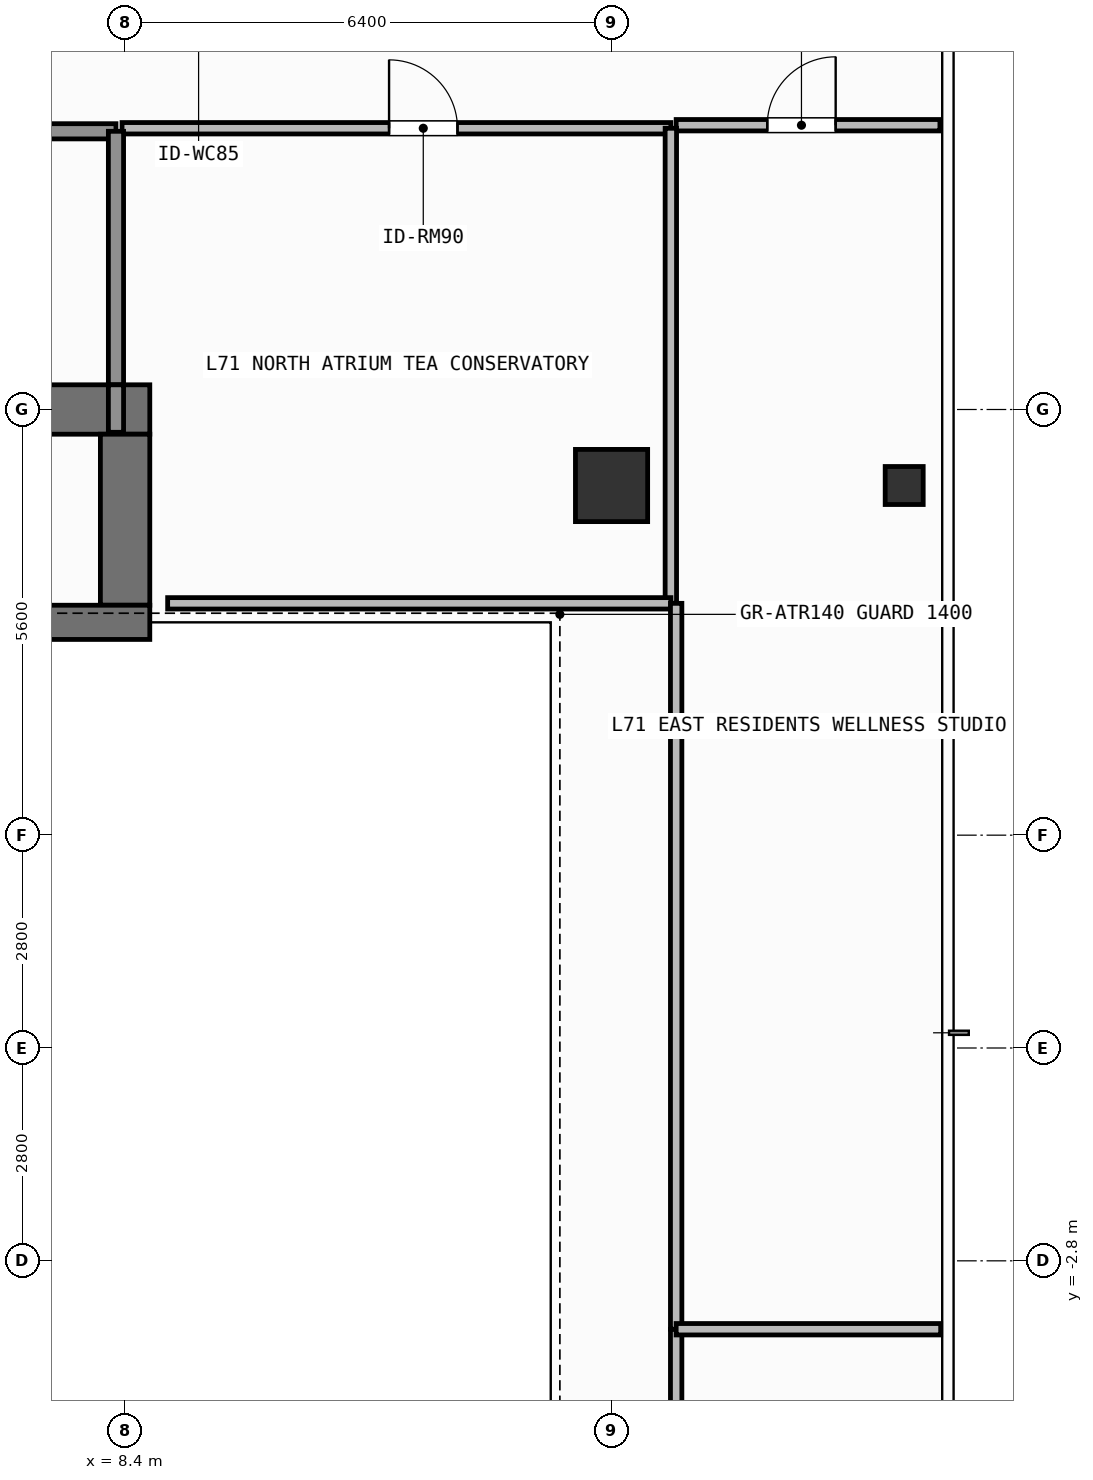
"""IFC4 building model, lengths in metres.
Left out: names, types, materials, properties, quantities, classifications, styles, units other than length and angle.
Written with IfcOpenShell. Run it as: python <this file> out.ifc"""

import sys

from ifc_helpers import new_model, si_unit, direction, frame, frame_2d, origin, origin_2d, place, context, subcontext, project, spatial, rectangle, hollow_rectangle, extrude, element, fill, save


model = new_model("IFC4")
c1 = context("Model", 3, precision=1e-05, world=origin(), true_north=direction((0.0, 1.0)))
c2 = subcontext(c1, "Body", "Model", "MODEL_VIEW")
j1 = project(units=[si_unit("LENGTHUNIT", "METRE"), si_unit("PLANEANGLEUNIT", "RADIAN")], contexts=[c1])
p1 = place(None, origin())
s1 = spatial("IfcSite", under=j1, at=p1, CompositionType="ELEMENT")
p2 = place(p1, origin())
s2 = spatial("IfcBuilding", under=s1, at=p2, CompositionType="ELEMENT")
p3 = place(p2, frame((0.0, 0.0, 289.8)))
s3 = spatial("IfcBuildingStorey", under=s2, at=p3, CompositionType="ELEMENT", Elevation=289.8)
p4 = place(p3, frame((-7.55, 8.4, 0.0), z_axis=(0.0, 0.0, 1.0), x_axis=(1.0, 0.0, 0.0)))
e1 = element("IfcWall", 1, at=p4, inside=s3, PredefinedType="SHEAR", context=c2, shape_type="SweptSolid", body=[
    extrude(rectangle(XDim=16.275, YDim=0.65, at=frame_2d((8.138, 0.0))), origin(), (0.0, 0.0, 1.0), 3.9),
])
p5 = place(p3, frame((8.4, 5.825, 0.0), z_axis=(0.0, 0.0, 1.0), x_axis=(0.0, 1.0, 0.0)))
e2 = element("IfcWall", 2, at=p5, inside=s3, PredefinedType="SHEAR", context=c2, shape_type="SweptSolid", body=[
    extrude(rectangle(XDim=2.25, YDim=0.65, at=frame_2d((1.125, 0.0))), origin(), (0.0, 0.0, 1.0), 3.9),
])
p6 = place(p3, frame((3.045, 5.6, 0.0), z_axis=(0.0, 0.0, 1.0), x_axis=(1.0, 0.0, 0.0)))
e3 = element("IfcWall", 3, at=p6, inside=s3, PredefinedType="SHEAR", context=c2, shape_type="SweptSolid", body=[
    extrude(rectangle(XDim=5.68, YDim=0.45, at=frame_2d((2.84, 0.0))), origin(), (0.0, 0.0, 1.0), 3.9),
])
p7 = place(p3, frame((14.8, 7.4, 0.0), z_axis=(0.0, 0.0, 1.0), x_axis=(1.0, 0.0, 0.0)))
e4 = element("IfcColumn", 4, at=p7, inside=s3, PredefinedType="COLUMN", context=c2, shape_type="SweptSolid", body=[
    extrude(rectangle(XDim=0.95, YDim=0.95, at=origin_2d()), origin(), (0.0, 0.0, 1.0), 3.9),
])
p8 = place(p3, frame((18.65, 7.4, 0.0), z_axis=(0.0, 0.0, 1.0), x_axis=(1.0, 0.0, 0.0)))
e5 = element("IfcColumn", 5, at=p8, inside=s3, PredefinedType="COLUMN", context=c2, shape_type="SweptSolid", body=[
    extrude(hollow_rectangle(XDim=0.5, YDim=0.5, WallThickness=0.025, at=origin_2d()), origin(), (0.0, 0.0, 1.0), 3.9),
])
p9 = place(p3, frame((4.58, 12.06, 0.0), z_axis=(0.0, 0.0, 1.0), x_axis=(1.0, 0.0, 0.0)))
e6 = element("IfcWall", 6, at=p9, inside=s3, PredefinedType="SOLIDWALL", context=c2, shape_type="SweptSolid", body=[
    extrude(rectangle(XDim=3.7, YDim=0.2, at=frame_2d((1.85, 0.0))), origin(), (0.0, 0.0, 1.0), 3.68),
])
p10 = place(p9, frame((1.212, 0.0, 0.0)))
e7 = element("IfcOpeningElement", 7, at=p10, cuts=e6, PredefinedType="OPENING", context=c2, shape_type="SweptSolid", body=[
    extrude(rectangle(XDim=1.1, YDim=2.15, at=frame_2d((0.55, 1.075))), frame((0.0, 0.11, 0.0), z_axis=(0.0, -1.0, 0.0), x_axis=(1.0, 0.0, 0.0)), (0.0, 0.0, 1.0), 0.22),
])
p11 = place(p3, frame((8.36, 12.1, 0.0), z_axis=(0.0, 0.0, 1.0), x_axis=(1.0, 0.0, 0.0)))
e8 = element("IfcWall", 8, at=p11, inside=s3, PredefinedType="PARTITIONING", context=c2, shape_type="SweptSolid", body=[
    extrude(rectangle(XDim=7.22, YDim=0.15, at=frame_2d((3.61, 0.0))), origin(), (0.0, 0.0, 1.0), 3.68),
])
p12 = place(p11, frame((3.513, 0.0, 0.0)))
e9 = element("IfcOpeningElement", 9, at=p12, cuts=e8, PredefinedType="OPENING", context=c2, shape_type="SweptSolid", body=[
    extrude(rectangle(XDim=0.9, YDim=2.1, at=frame_2d((0.45, 1.05))), frame((0.0, 0.085, 0.0), z_axis=(0.0, -1.0, 0.0), x_axis=(1.0, 0.0, 0.0)), (0.0, 0.0, 1.0), 0.17),
])
p13 = place(p3, frame((15.65, 12.14, 0.0), z_axis=(0.0, 0.0, 1.0), x_axis=(1.0, 0.0, 0.0)))
e10 = element("IfcWall", 10, at=p13, inside=s3, PredefinedType="PARTITIONING", context=c2, shape_type="SweptSolid", body=[
    extrude(rectangle(XDim=3.47, YDim=0.15, at=frame_2d((1.735, 0.0))), origin(), (0.0, 0.0, 1.0), 3.68),
])
p14 = place(p13, frame((1.198, 0.0, 0.0)))
e11 = element("IfcOpeningElement", 11, at=p14, cuts=e10, PredefinedType="OPENING", context=c2, shape_type="SweptSolid", body=[
    extrude(rectangle(XDim=0.9, YDim=2.1, at=frame_2d((0.45, 1.05))), frame((0.0, 0.085, 0.0), z_axis=(0.0, -1.0, 0.0), x_axis=(1.0, 0.0, 0.0)), (0.0, 0.0, 1.0), 0.17),
])
p15 = place(p3, frame((8.28, 8.725, 0.0), z_axis=(0.0, 0.0, 1.0), x_axis=(0.0, 1.0, 0.0)))
e12 = element("IfcWall", 12, at=p15, inside=s3, PredefinedType="SOLIDWALL", context=c2, shape_type="SweptSolid", body=[
    extrude(rectangle(XDim=3.335, YDim=0.2, at=frame_2d((1.667, 0.0))), origin(), (0.0, 0.0, 1.0), 3.68),
])
p16 = place(p3, frame((8.28, 8.1, 0.0), z_axis=(0.0, 0.0, 1.0), x_axis=(0.0, 1.0, 0.0)))
e13 = element("IfcWall", 13, at=p16, inside=s3, PredefinedType="SOLIDWALL", context=c2, shape_type="SweptSolid", body=[
    extrude(rectangle(XDim=0.625, YDim=0.2, at=frame_2d((0.312, 0.0))), origin(), (0.0, 0.0, 1.0), 3.68),
])
p17 = place(p3, frame((15.58, 5.85, 0.0), z_axis=(0.0, 0.0, 1.0), x_axis=(0.0, 1.0, 0.0)))
e14 = element("IfcWall", 14, at=p17, inside=s3, PredefinedType="PARTITIONING", context=c2, shape_type="SweptSolid", body=[
    extrude(rectangle(XDim=6.25, YDim=0.15, at=frame_2d((3.125, 0.0))), origin(), (0.0, 0.0, 1.0), 3.68),
])
p18 = place(p3, frame((8.96, 5.85, 0.0), z_axis=(0.0, 0.0, 1.0), x_axis=(1.0, 0.0, 0.0)))
e15 = element("IfcWall", 15, at=p18, inside=s3, PredefinedType="PARTITIONING", context=c2, shape_type="SweptSolid", body=[
    extrude(rectangle(XDim=6.62, YDim=0.15, at=frame_2d((3.31, 0.0))), origin(), (0.0, 0.0, 1.0), 3.68),
])
p19 = place(p3, frame((15.65, -5.85, 0.0), z_axis=(0.0, 0.0, 1.0), x_axis=(0.0, 1.0, 0.0)))
e16 = element("IfcWall", 16, at=p19, inside=s3, PredefinedType="PARTITIONING", context=c2, shape_type="SweptSolid", body=[
    extrude(rectangle(XDim=2.15, YDim=0.15, at=frame_2d((1.075, 0.0))), origin(), (0.0, 0.0, 1.0), 3.68),
])
p20 = place(p3, frame((15.65, -3.7, 0.0), z_axis=(0.0, 0.0, 1.0), x_axis=(0.0, 1.0, 0.0)))
e17 = element("IfcWall", 17, at=p20, inside=s3, PredefinedType="PARTITIONING", context=c2, shape_type="SweptSolid", body=[
    extrude(rectangle(XDim=9.55, YDim=0.15, at=frame_2d((4.775, 0.0))), origin(), (0.0, 0.0, 1.0), 3.68),
])
p21 = place(p3, frame((15.65, -3.7, 0.0), z_axis=(0.0, 0.0, 1.0), x_axis=(1.0, 0.0, 0.0)))
e18 = element("IfcWall", 18, at=p21, inside=s3, PredefinedType="PARTITIONING", context=c2, shape_type="SweptSolid", body=[
    extrude(rectangle(XDim=3.48, YDim=0.15, at=frame_2d((1.74, 0.0))), origin(), (0.0, 0.0, 1.0), 3.68),
])
p22 = place(p12, origin())
e19 = element("IfcDoor", 19, at=p22, inside=s3, OperationType="SINGLE_SWING_LEFT", PredefinedType="DOOR", context=c2, shape_type="SweptSolid", body=[
    extrude(rectangle(XDim=0.9, YDim=2.1, at=frame_2d((0.45, 1.05))), frame((0.0, 0.025, 0.0), z_axis=(0.0, -1.0, 0.0), x_axis=(1.0, 0.0, 0.0)), (0.0, 0.0, 1.0), 0.05),
])
fill(e9, e19)
p23 = place(p14, origin())
e20 = element("IfcDoor", 20, at=p23, inside=s3, OperationType="SINGLE_SWING_RIGHT", PredefinedType="DOOR", context=c2, shape_type="SweptSolid", body=[
    extrude(rectangle(XDim=0.9, YDim=2.1, at=frame_2d((0.45, 1.05))), frame((0.0, 0.025, 0.0), z_axis=(0.0, -1.0, 0.0), x_axis=(1.0, 0.0, 0.0)), (0.0, 0.0, 1.0), 0.05),
])
fill(e11, e20)
save(model, sys.argv[1])
